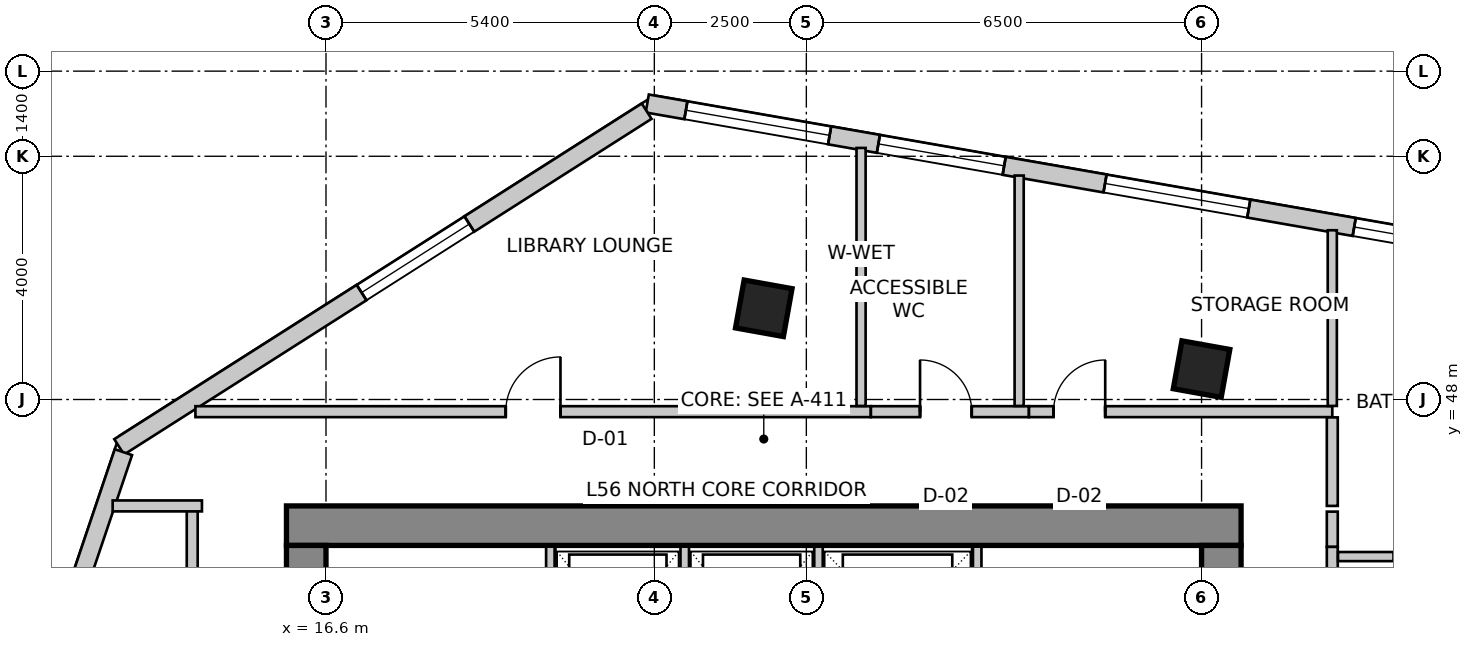
"""IFC4 building model, lengths in metres.
Left out: names, types, materials, properties, quantities, classifications, styles, units other than length and angle.
Written with IfcOpenShell. Run it as: python <this file> out.ifc"""

import sys

from ifc_helpers import new_model, si_unit, direction, frame, frame_2d, origin, origin_2d, place, context, subcontext, project, spatial, rectangle, extrude, source, transform, mapped, element, fill, save


model = new_model("IFC4")
c1 = context("Model", 3, precision=1e-05, world=origin(), true_north=direction((0.0, 1.0)))
c2 = subcontext(c1, "Body", "Model", "MODEL_VIEW")
j1 = project(units=[si_unit("LENGTHUNIT", "METRE"), si_unit("PLANEANGLEUNIT", "RADIAN")], contexts=[c1])
p1 = place(None, origin())
s1 = spatial("IfcSite", under=j1, at=p1, CompositionType="ELEMENT")
p2 = place(p1, origin())
s2 = spatial("IfcBuilding", under=s1, at=p2, CompositionType="ELEMENT")
p3 = place(p2, frame((0.0, 0.0, 221.9)))
s3 = spatial("IfcBuildingStorey", under=s2, at=p3, CompositionType="ELEMENT", Elevation=221.9)
p4 = place(p3, frame((15.95, 45.925, 0.0), z_axis=(0.0, 0.0, 1.0), x_axis=(1.0, 0.0, 0.0)))
e1 = element("IfcWall", 1, at=p4, inside=s3, PredefinedType="SHEAR", context=c2, shape_type="SweptSolid", body=[
    extrude(rectangle(XDim=15.7, YDim=0.65, at=frame_2d((7.85, 0.0))), origin(), (0.0, 0.0, 1.0), 3.5),
])
p5 = place(p3, frame((16.275, 34.2, 0.0), z_axis=(0.0, 0.0, 1.0), x_axis=(0.0, 1.0, 0.0)))
e2 = element("IfcWall", 2, at=p5, inside=s3, PredefinedType="SHEAR", context=c2, shape_type="SweptSolid", body=[
    extrude(rectangle(XDim=11.4, YDim=0.65, at=frame_2d((5.7, 0.0))), origin(), (0.0, 0.0, 1.0), 3.5),
])
m1 = source(origin(), c2, "Body", "SweptSolid", [
    extrude(rectangle(XDim=1.1, YDim=2.15, at=frame_2d((0.55, 1.075))), frame((0.0, 0.335, 0.0), z_axis=(0.0, -1.0, 0.0), x_axis=(1.0, 0.0, 0.0)), (0.0, 0.0, 1.0), 0.67),
])
p6 = place(p5, frame((7.15, 0.0, 0.0)))
e3 = element("IfcOpeningElement", 3, at=p6, cuts=e2, PredefinedType="OPENING", context=c2, shape_type="MappedRepresentation", body=[
    mapped(m1, transform((0.0, 0.0, 0.0), scale=1.0)),
])
p7 = place(p3, frame((31.325, 34.2, 0.0), z_axis=(0.0, 0.0, 1.0), x_axis=(0.0, 1.0, 0.0)))
e4 = element("IfcWall", 4, at=p7, inside=s3, PredefinedType="SHEAR", context=c2, shape_type="SweptSolid", body=[
    extrude(rectangle(XDim=11.4, YDim=0.65, at=frame_2d((5.7, 0.0))), origin(), (0.0, 0.0, 1.0), 3.5),
])
p8 = place(p7, frame((7.35, 0.0, 0.0)))
e5 = element("IfcOpeningElement", 5, at=p8, cuts=e4, PredefinedType="OPENING", context=c2, shape_type="MappedRepresentation", body=[
    mapped(m1, transform((0.0, 0.0, 0.0), scale=1.0)),
])
m2 = source(origin(), c2, "Body", "SweptSolid", [
    extrude(rectangle(XDim=0.8, YDim=0.8, at=origin_2d()), origin(), (0.0, 0.0, 1.0), 3.5),
])
for number, where, z_axis, x_axis in (
    (6, (23.8, 49.5, 0.0), (0.0, 0.0, 1.0), (0.984, -0.177, 0.0)),
    (7, (31.0, 48.5, 0.0), (0.0, 0.0, 1.0), (0.984, -0.177, 0.0)),
):
    element("IfcColumn", number, at=place(p3, frame(where, z_axis=z_axis, x_axis=x_axis)), inside=s3, PredefinedType="COLUMN", context=c2, shape_type="MappedRepresentation", body=[
        mapped(m2, transform((0.0, 0.0, 0.0), scale=1.0)),
    ])
p9 = place(p3, frame((43.561, 49.081, 0.0), z_axis=(0.0, 0.0, 1.0), x_axis=(-0.985083967494, 0.17207433564, 0.0)))
e8 = element("IfcWall", 8, at=p9, inside=s3, PredefinedType="SOLIDWALL", context=c2, shape_type="SweptSolid", body=[
    extrude(rectangle(XDim=22.006, YDim=0.3, at=frame_2d((11.003, 0.0))), origin(), (0.0, 0.0, 1.0), 3.25),
])
m3 = source(origin(), c2, "Body", "SweptSolid", [
    extrude(rectangle(XDim=2.4, YDim=2.2, at=frame_2d((1.2, 1.1))), frame((0.0, 0.16, 0.0), z_axis=(0.0, -1.0, 0.0), x_axis=(1.0, 0.0, 0.0)), (0.0, 0.0, 1.0), 0.32),
])
p10 = place(p9, frame((0.8, 0.0, 0.85)))
e9 = element("IfcOpeningElement", 9, at=p10, cuts=e8, PredefinedType="OPENING", context=c2, shape_type="MappedRepresentation", body=[
    mapped(m3, transform((0.0, 0.0, 0.0), scale=1.0)),
])
p11 = place(p9, frame((4.628, 0.0, 0.85)))
e10 = element("IfcOpeningElement", 10, at=p11, cuts=e8, PredefinedType="OPENING", context=c2, shape_type="MappedRepresentation", body=[
    mapped(m3, transform((0.0, 0.0, 0.0), scale=1.0)),
])
m4 = source(origin(), c2, "Body", "SweptSolid", [
    extrude(rectangle(XDim=2.1, YDim=2.0, at=frame_2d((1.05, 1.0))), frame((0.0, 0.16, 0.0), z_axis=(0.0, -1.0, 0.0), x_axis=(1.0, 0.0, 0.0)), (0.0, 0.0, 1.0), 0.32),
])
p12 = place(p9, frame((8.103, 0.0, 0.85)))
e11 = element("IfcOpeningElement", 11, at=p12, cuts=e8, PredefinedType="OPENING", context=c2, shape_type="MappedRepresentation", body=[
    mapped(m4, transform((0.0, 0.0, 0.0), scale=1.0)),
])
p13 = place(p9, frame((11.963, 0.0, 0.85)))
e12 = element("IfcOpeningElement", 12, at=p13, cuts=e8, PredefinedType="OPENING", context=c2, shape_type="MappedRepresentation", body=[
    mapped(m3, transform((0.0, 0.0, 0.0), scale=1.0)),
])
p14 = place(p9, frame((16.047, 0.0, 0.85)))
e13 = element("IfcOpeningElement", 13, at=p14, cuts=e8, PredefinedType="OPENING", context=c2, shape_type="MappedRepresentation", body=[
    mapped(m4, transform((0.0, 0.0, 0.0), scale=1.0)),
])
p15 = place(p9, frame((18.961, 0.0, 0.85)))
e14 = element("IfcOpeningElement", 14, at=p15, cuts=e8, PredefinedType="OPENING", context=c2, shape_type="MappedRepresentation", body=[
    mapped(m3, transform((0.0, 0.0, 0.0), scale=1.0)),
])
p16 = place(p3, frame((21.874, 52.742, 0.0), z_axis=(0.0, 0.0, 1.0), x_axis=(-0.84365659959, -0.536883173482, 0.0)))
e15 = element("IfcWall", 15, at=p16, inside=s3, PredefinedType="SOLIDWALL", context=c2, shape_type="SweptSolid", body=[
    extrude(rectangle(XDim=10.283, YDim=0.3, at=frame_2d((5.142, 0.0))), origin(), (0.0, 0.0, 1.0), 3.25),
])
p17 = place(p16, frame((3.457, 0.0, 0.85)))
e16 = element("IfcOpeningElement", 16, at=p17, cuts=e15, PredefinedType="OPENING", context=c2, shape_type="MappedRepresentation", body=[
    mapped(m4, transform((0.0, 0.0, 0.0), scale=1.0)),
])
p18 = place(p3, frame((13.269, 47.134, 0.0), z_axis=(0.0, 0.0, 1.0), x_axis=(-0.319920776449, -0.947444297464, 0.0)))
e17 = element("IfcWall", 17, at=p18, inside=s3, PredefinedType="SOLIDWALL", context=c2, shape_type="SweptSolid", body=[
    extrude(rectangle(XDim=16.133, YDim=0.3, at=frame_2d((8.067, 0.0))), origin(), (0.0, 0.0, 1.0), 3.25),
])
p19 = place(p18, frame((2.363, 0.0, 0.85)))
e18 = element("IfcOpeningElement", 18, at=p19, cuts=e17, PredefinedType="OPENING", context=c2, shape_type="MappedRepresentation", body=[
    mapped(m3, transform((0.0, 0.0, 0.0), scale=1.0)),
])
p20 = place(p18, frame((7.41, 0.0, 0.85)))
e19 = element("IfcOpeningElement", 19, at=p20, cuts=e17, PredefinedType="OPENING", context=c2, shape_type="MappedRepresentation", body=[
    mapped(m4, transform((0.0, 0.0, 0.0), scale=1.0)),
])
p21 = place(p18, frame((12.157, 0.0, 0.85)))
e20 = element("IfcOpeningElement", 20, at=p21, cuts=e17, PredefinedType="OPENING", context=c2, shape_type="MappedRepresentation", body=[
    mapped(m3, transform((0.0, 0.0, 0.0), scale=1.0)),
])
for number, where, z_axis, x_axis in (
    (21, (20.29, 43.28, 0.0), (0.0, 0.0, 1.0), (0.0, 1.0, 0.0)),
    (22, (27.31, 43.28, 0.0), (0.0, 0.0, 1.0), (0.0, 1.0, 0.0)),
):
    element("IfcWall", number, at=place(p3, frame(where, z_axis=z_axis, x_axis=x_axis)), inside=s3, PredefinedType="SOLIDWALL", context=c2, shape_type="SweptSolid", body=[
        extrude(rectangle(XDim=2.3, YDim=0.14, at=frame_2d((1.15, 0.0))), origin(), (0.0, 0.0, 1.0), 3.25),
    ])
for number, where, z_axis, x_axis in (
    (23, (22.5, 43.02, 0.0), (0.0, 0.0, 1.0), (0.0, 1.0, 0.0)),
    (24, (24.7, 43.02, 0.0), (0.0, 0.0, 1.0), (0.0, 1.0, 0.0)),
):
    element("IfcWall", number, at=place(p3, frame(where, z_axis=z_axis, x_axis=x_axis)), inside=s3, PredefinedType="SOLIDWALL", context=c2, shape_type="SweptSolid", body=[
        extrude(rectangle(XDim=2.56, YDim=0.14, at=frame_2d((1.28, 0.0))), origin(), (0.0, 0.0, 1.0), 3.25),
    ])
p22 = place(p3, frame((14.4, 33.644, 0.0), z_axis=(0.0, 0.0, 1.0), x_axis=(0.0, 1.0, 0.0)))
e25 = element("IfcWall", 25, at=p22, inside=s3, PredefinedType="PARTITIONING", context=c2, shape_type="SweptSolid", body=[
    extrude(rectangle(XDim=12.606, YDim=0.18, at=frame_2d((6.303, 0.0))), origin(), (0.0, 0.0, 1.0), 3.25),
])
m5 = source(origin(), c2, "Body", "SweptSolid", [
    extrude(rectangle(XDim=0.9, YDim=2.15, at=frame_2d((0.45, 1.075))), frame((0.0, 0.1, 0.0), z_axis=(0.0, -1.0, 0.0), x_axis=(1.0, 0.0, 0.0)), (0.0, 0.0, 1.0), 0.2),
])
p23 = place(p22, frame((4.399, 0.0, 0.0)))
e26 = element("IfcOpeningElement", 26, at=p23, cuts=e25, PredefinedType="OPENING", context=c2, shape_type="MappedRepresentation", body=[
    mapped(m5, transform((0.0, 0.0, 0.0), scale=1.0)),
])
p24 = place(p3, frame((14.56, 46.25, 0.0), z_axis=(0.0, 0.0, 1.0), x_axis=(-1.0, 0.0, 0.0)))
e27 = element("IfcWall", 27, at=p24, inside=s3, PredefinedType="PARTITIONING", context=c2, shape_type="SweptSolid", body=[
    extrude(rectangle(XDim=1.469, YDim=0.18, at=frame_2d((0.734, 0.0))), origin(), (0.0, 0.0, 1.0), 3.25),
])
p25 = place(p3, frame((14.453, 47.8, 0.0), z_axis=(0.0, 0.0, 1.0), x_axis=(1.0, 0.0, 0.0)))
e28 = element("IfcWall", 28, at=p25, inside=s3, PredefinedType="PARTITIONING", context=c2, shape_type="SweptSolid", body=[
    extrude(rectangle(XDim=11.107, YDim=0.18, at=frame_2d((5.554, 0.0))), origin(), (0.0, 0.0, 1.0), 2.934),
])
p26 = place(p25, frame((5.104, 0.0, 0.0)))
e29 = element("IfcOpeningElement", 29, at=p26, cuts=e28, PredefinedType="OPENING", context=c2, shape_type="MappedRepresentation", body=[
    mapped(m5, transform((0.0, 0.0, 0.0), scale=1.0)),
])
p27 = place(p3, frame((25.562, 47.8, 0.0), z_axis=(0.0, 0.0, 1.0), x_axis=(1.0, 0.0, 0.0)))
e30 = element("IfcWall", 30, at=p27, inside=s3, PredefinedType="PARTITIONING", context=c2, shape_type="SweptSolid", body=[
    extrude(rectangle(XDim=2.598, YDim=0.18, at=frame_2d((1.299, 0.0))), origin(), (0.0, 0.0, 1.0), 3.25),
])
m6 = source(origin(), c2, "Body", "SweptSolid", [
    extrude(rectangle(XDim=0.85, YDim=2.15, at=frame_2d((0.425, 1.075))), frame((0.0, 0.1, 0.0), z_axis=(0.0, -1.0, 0.0), x_axis=(1.0, 0.0, 0.0)), (0.0, 0.0, 1.0), 0.2),
])
p28 = place(p27, frame((0.808, 0.0, 0.0)))
e31 = element("IfcOpeningElement", 31, at=p28, cuts=e30, PredefinedType="OPENING", context=c2, shape_type="MappedRepresentation", body=[
    mapped(m6, transform((0.0, 0.0, 0.0), scale=1.0)),
])
p29 = place(p3, frame((28.162, 47.8, 0.0), z_axis=(0.0, 0.0, 1.0), x_axis=(1.0, 0.0, 0.0)))
e32 = element("IfcWall", 32, at=p29, inside=s3, PredefinedType="PARTITIONING", context=c2, shape_type="SweptSolid", body=[
    extrude(rectangle(XDim=4.988, YDim=0.18, at=frame_2d((2.494, 0.0))), origin(), (0.0, 0.0, 1.0), 2.822),
])
p30 = place(p29, frame((0.403, 0.0, 0.0)))
e33 = element("IfcOpeningElement", 33, at=p30, cuts=e32, PredefinedType="OPENING", context=c2, shape_type="MappedRepresentation", body=[
    mapped(m6, transform((0.0, 0.0, 0.0), scale=1.0)),
])
p31 = place(p3, frame((33.15, 47.706, 0.0), z_axis=(0.0, 0.0, 1.0), x_axis=(0.0, -1.0, 0.0)))
e34 = element("IfcWall", 34, at=p31, inside=s3, PredefinedType="PARTITIONING", context=c2, shape_type="SweptSolid", body=[
    extrude(rectangle(XDim=1.456, YDim=0.18, at=frame_2d((0.728, 0.0))), origin(), (0.0, 0.0, 1.0), 2.934),
])
p32 = place(p3, frame((33.15, 45.577, 0.0), z_axis=(0.0, 0.0, 1.0), x_axis=(0.0, -1.0, 0.0)))
e35 = element("IfcWall", 35, at=p32, inside=s3, PredefinedType="PARTITIONING", context=c2, shape_type="SweptSolid", body=[
    extrude(rectangle(XDim=5.687, YDim=0.18, at=frame_2d((2.844, 0.0))), origin(), (0.0, 0.0, 1.0), 2.822),
])
p33 = place(p3, frame((33.15, 46.156, 0.0), z_axis=(0.0, 0.0, 1.0), x_axis=(0.0, -1.0, 0.0)))
e36 = element("IfcWall", 36, at=p33, inside=s3, PredefinedType="PARTITIONING", context=c2, shape_type="SweptSolid", body=[
    extrude(rectangle(XDim=0.577, YDim=0.18, at=frame_2d((0.289, 0.0))), origin(), (0.0, 0.0, 1.0), 2.822),
])
p34 = place(p3, frame((25.4, 52.137, 0.0), z_axis=(0.0, 0.0, 1.0), x_axis=(0.0, -1.0, 0.0)))
e37 = element("IfcWall", 37, at=p34, inside=s3, PredefinedType="PARTITIONING", context=c2, shape_type="SweptSolid", body=[
    extrude(rectangle(XDim=4.243, YDim=0.15, at=frame_2d((2.122, 0.0))), origin(), (0.0, 0.0, 1.0), 2.542),
])
p35 = place(p3, frame((28.0, 51.683, 0.0), z_axis=(0.0, 0.0, 1.0), x_axis=(0.0, -1.0, 0.0)))
e38 = element("IfcWall", 38, at=p35, inside=s3, PredefinedType="PARTITIONING", context=c2, shape_type="SweptSolid", body=[
    extrude(rectangle(XDim=3.789, YDim=0.15, at=frame_2d((1.895, 0.0))), origin(), (0.0, 0.0, 1.0), 2.542),
])
p36 = place(p3, frame((33.15, 50.783, 0.0), z_axis=(0.0, 0.0, 1.0), x_axis=(0.0, -1.0, 0.0)))
e39 = element("IfcWall", 39, at=p36, inside=s3, PredefinedType="PARTITIONING", context=c2, shape_type="SweptSolid", body=[
    extrude(rectangle(XDim=2.889, YDim=0.15, at=frame_2d((1.445, 0.0))), origin(), (0.0, 0.0, 1.0), 2.542),
])
p37 = place(p3, frame((33.244, 45.417, 0.0), z_axis=(0.0, 0.0, 1.0), x_axis=(1.0, 0.0, 0.0)))
e40 = element("IfcWall", 40, at=p37, inside=s3, PredefinedType="PARTITIONING", context=c2, shape_type="SweptSolid", body=[
    extrude(rectangle(XDim=2.816, YDim=0.15, at=frame_2d((1.408, 0.0))), origin(), (0.0, 0.0, 1.0), 2.934),
])
m7 = source(origin(), c2, "Body", "SweptSolid", [
    extrude(rectangle(XDim=0.85, YDim=2.15, at=frame_2d((0.425, 1.075))), frame((0.0, 0.085, 0.0), z_axis=(0.0, -1.0, 0.0), x_axis=(1.0, 0.0, 0.0)), (0.0, 0.0, 1.0), 0.17),
])
p38 = place(p37, frame((0.919, 0.0, 0.0)))
e41 = element("IfcOpeningElement", 41, at=p38, cuts=e40, PredefinedType="OPENING", context=c2, shape_type="MappedRepresentation", body=[
    mapped(m7, transform((0.0, 0.0, 0.0), scale=1.0)),
])
m8 = source(origin(), c2, "Body", "SweptSolid", [
    extrude(rectangle(XDim=2.1, YDim=2.0, at=frame_2d((1.05, 1.0))), frame((0.0, -0.015, 0.0), z_axis=(0.0, -1.0, 0.0), x_axis=(1.0, 0.0, 0.0)), (0.0, 0.0, 1.0), 0.06),
])
p39 = place(p12, origin())
e42 = element("IfcWindow", 42, at=p39, inside=s3, PartitioningType="SINGLE_PANEL", PredefinedType="WINDOW", context=c2, shape_type="MappedRepresentation", body=[
    mapped(m8, transform((0.0, 0.0, 0.0), scale=1.0)),
])
fill(e11, e42)
m9 = source(origin(), c2, "Body", "SweptSolid", [
    extrude(rectangle(XDim=2.4, YDim=2.2, at=frame_2d((1.2, 1.1))), frame((0.0, -0.015, 0.0), z_axis=(0.0, -1.0, 0.0), x_axis=(1.0, 0.0, 0.0)), (0.0, 0.0, 1.0), 0.06),
])
p40 = place(p13, origin())
e43 = element("IfcWindow", 43, at=p40, inside=s3, PartitioningType="SINGLE_PANEL", PredefinedType="WINDOW", context=c2, shape_type="MappedRepresentation", body=[
    mapped(m9, transform((0.0, 0.0, 0.0), scale=1.0)),
])
fill(e12, e43)
p41 = place(p14, origin())
e44 = element("IfcWindow", 44, at=p41, inside=s3, PartitioningType="SINGLE_PANEL", PredefinedType="WINDOW", context=c2, shape_type="MappedRepresentation", body=[
    mapped(m8, transform((0.0, 0.0, 0.0), scale=1.0)),
])
fill(e13, e44)
p42 = place(p15, origin())
e45 = element("IfcWindow", 45, at=p42, inside=s3, PartitioningType="SINGLE_PANEL", PredefinedType="WINDOW", context=c2, shape_type="MappedRepresentation", body=[
    mapped(m9, transform((0.0, 0.0, 0.0), scale=1.0)),
])
fill(e14, e45)
p43 = place(p17, origin())
e46 = element("IfcWindow", 46, at=p43, inside=s3, PartitioningType="SINGLE_PANEL", PredefinedType="WINDOW", context=c2, shape_type="MappedRepresentation", body=[
    mapped(m8, transform((0.0, 0.0, 0.0), scale=1.0)),
])
fill(e16, e46)
m10 = source(origin(), c2, "Body", "SweptSolid", [
    extrude(rectangle(XDim=0.9, YDim=2.15, at=frame_2d((0.45, 1.075))), frame((0.0, 0.025, 0.0), z_axis=(0.0, -1.0, 0.0), x_axis=(1.0, 0.0, 0.0)), (0.0, 0.0, 1.0), 0.05),
])
p44 = place(p26, origin())
e47 = element("IfcDoor", 47, at=p44, inside=s3, OperationType="SINGLE_SWING_RIGHT", PredefinedType="DOOR", context=c2, shape_type="MappedRepresentation", body=[
    mapped(m10, transform((0.0, 0.0, 0.0), scale=1.0)),
])
fill(e29, e47)
m11 = source(origin(), c2, "Body", "SweptSolid", [
    extrude(rectangle(XDim=0.85, YDim=2.15, at=frame_2d((0.425, 1.075))), frame((0.0, 0.025, 0.0), z_axis=(0.0, -1.0, 0.0), x_axis=(1.0, 0.0, 0.0)), (0.0, 0.0, 1.0), 0.05),
])
p45 = place(p28, origin())
e48 = element("IfcDoor", 48, at=p45, inside=s3, OperationType="SINGLE_SWING_LEFT", PredefinedType="DOOR", context=c2, shape_type="MappedRepresentation", body=[
    mapped(m11, transform((0.0, 0.0, 0.0), scale=1.0)),
])
fill(e31, e48)
p46 = place(p30, origin())
e49 = element("IfcDoor", 49, at=p46, inside=s3, OperationType="SINGLE_SWING_RIGHT", PredefinedType="DOOR", context=c2, shape_type="MappedRepresentation", body=[
    mapped(m11, transform((0.0, 0.0, 0.0), scale=1.0)),
])
fill(e33, e49)
save(model, sys.argv[1])
